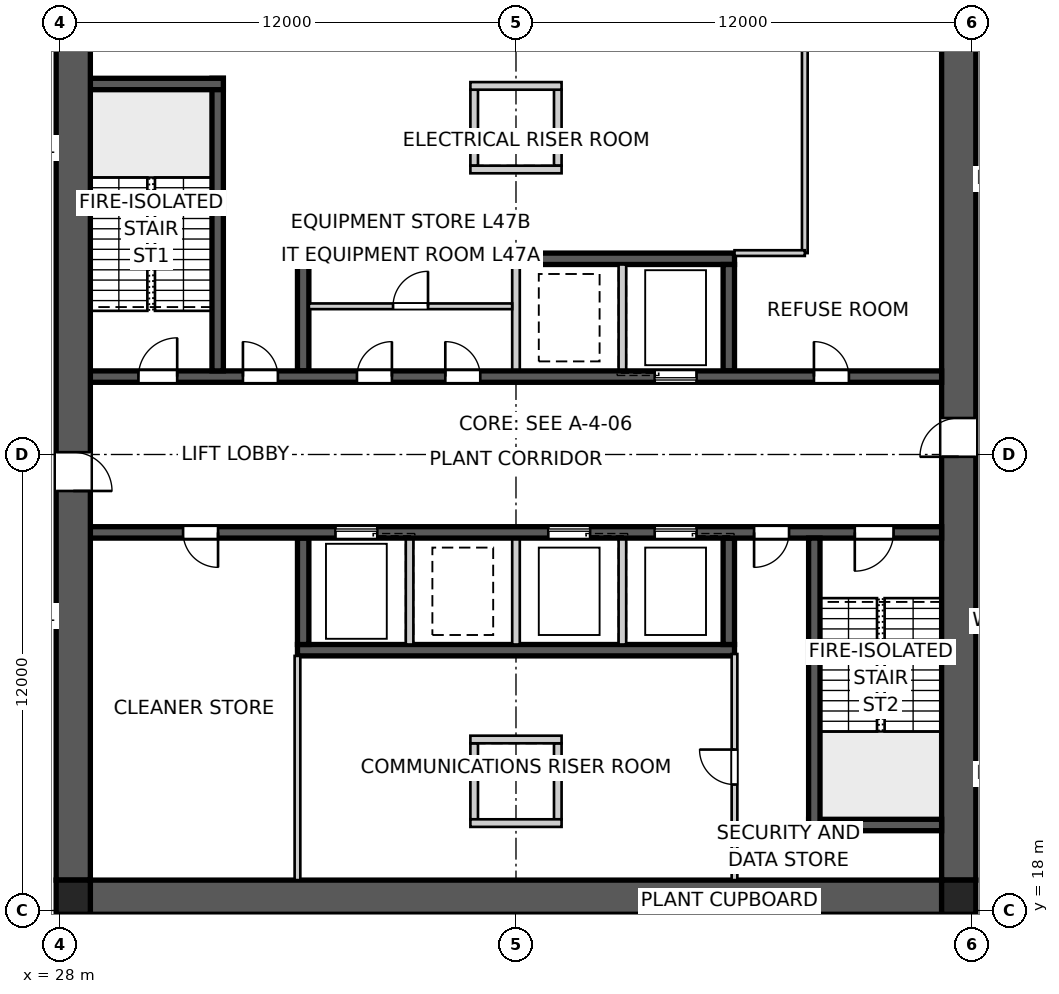
"""IFC4 building model, lengths in metres.
Left out: names, types, materials, properties, quantities, classifications, styles, units other than length and angle.
Written with IfcOpenShell. Run it as: python <this file> out.ifc"""

import sys

from ifc_helpers import new_model, si_unit, direction, frame, frame_2d, origin, origin_2d, place, context, subcontext, project, spatial, polyline, rectangle, outline, extrude, element, fill, save


model = new_model("IFC4")
c1 = context("Model", 3, precision=1e-05, world=origin(), true_north=direction((0.0, 1.0)))
c2 = subcontext(c1, "Body", "Model", "MODEL_VIEW")
j1 = project(units=[si_unit("LENGTHUNIT", "METRE"), si_unit("PLANEANGLEUNIT", "RADIAN")], contexts=[c1])
p1 = place(None, origin())
s1 = spatial("IfcSite", under=j1, at=p1, CompositionType="ELEMENT")
p2 = place(p1, origin())
s2 = spatial("IfcBuilding", under=s1, at=p2, CompositionType="ELEMENT")
p3 = place(p2, frame((0.0, 0.0, 171.0)))
s3 = spatial("IfcBuildingStorey", under=s2, at=p3, CompositionType="ELEMENT", Elevation=171.0)
p4 = place(p3, frame((51.2, 18.35, 0.0), z_axis=(0.0, 0.0, 1.0), x_axis=(-1.0, 0.0, 0.0)))
e1 = element("IfcWall", 1, at=p4, inside=s3, PredefinedType="SHEAR", context=c2, shape_type="SweptSolid", body=[
    extrude(outline(polyline([(0.0, -0.45), (22.4, -0.45), (22.4, -0.025), (22.85, -0.025), (22.85, 0.025), (22.4, 0.025), (22.4, 0.45), (0.0, 0.45), (0.0, 0.025), (-0.45, 0.025), (-0.45, -0.025), (0.0, -0.025), (0.0, -0.45)])), origin(), (0.0, 0.0, 1.0), 5.0),
])
p5 = place(p3, frame((51.65, 18.8, 0.0), z_axis=(0.0, 0.0, 1.0), x_axis=(0.0, 1.0, 0.0)))
e2 = element("IfcWall", 2, at=p5, inside=s3, PredefinedType="SHEAR", context=c2, shape_type="SweptSolid", body=[
    extrude(outline(polyline([(0.0, -0.45), (22.4, -0.45), (22.4, -0.025), (22.85, -0.025), (22.85, 0.025), (22.4, 0.025), (22.4, 0.45), (0.0, 0.45), (0.0, 0.025), (-0.45, 0.025), (-0.45, -0.025), (0.0, -0.025), (0.0, -0.45)])), origin(), (0.0, 0.0, 1.0), 5.0),
])
p6 = place(p5, frame((11.14, 0.0, 0.0)))
e3 = element("IfcOpeningElement", 3, at=p6, cuts=e2, PredefinedType="OPENING", context=c2, shape_type="SweptSolid", body=[
    extrude(rectangle(XDim=1.02, YDim=2.4, at=frame_2d((0.51, 1.2))), frame((0.0, 0.46, 0.0), z_axis=(0.0, -1.0, 0.0), x_axis=(1.0, 0.0, 0.0)), (0.0, 0.0, 1.0), 0.92),
])
p7 = place(p3, frame((28.35, 41.2, 0.0), z_axis=(0.0, 0.0, 1.0), x_axis=(0.0, -1.0, 0.0)))
e4 = element("IfcWall", 4, at=p7, inside=s3, PredefinedType="SHEAR", context=c2, shape_type="SweptSolid", body=[
    extrude(outline(polyline([(0.0, -0.45), (22.4, -0.45), (22.4, -0.025), (22.85, -0.025), (22.85, 0.025), (22.4, 0.025), (22.4, 0.45), (0.0, 0.45), (0.0, 0.025), (-0.45, 0.025), (-0.45, -0.025), (0.0, -0.025), (0.0, -0.45)])), origin(), (0.0, 0.0, 1.0), 5.0),
])
p8 = place(p7, frame((11.14, 0.0, 0.0)))
e5 = element("IfcOpeningElement", 5, at=p8, cuts=e4, PredefinedType="OPENING", context=c2, shape_type="SweptSolid", body=[
    extrude(rectangle(XDim=1.02, YDim=2.4, at=frame_2d((0.51, 1.2))), frame((0.0, 0.46, 0.0), z_axis=(0.0, -1.0, 0.0), x_axis=(1.0, 0.0, 0.0)), (0.0, 0.0, 1.0), 0.92),
])
p9 = place(p3, frame((28.8, 32.05, 0.0), z_axis=(0.0, 0.0, 1.0), x_axis=(1.0, 0.0, 0.0)))
e6 = element("IfcWall", 6, at=p9, inside=s3, PredefinedType="SHEAR", context=c2, shape_type="SweptSolid", body=[
    extrude(rectangle(XDim=22.4, YDim=0.3, at=frame_2d((11.2, 0.0))), origin(), (0.0, 0.0, 1.0), 5.0),
])
p10 = place(p9, frame((19.04, 0.0, 0.0)))
e7 = element("IfcOpeningElement", 7, at=p10, cuts=e6, PredefinedType="OPENING", context=c2, shape_type="SweptSolid", body=[
    extrude(rectangle(XDim=0.92, YDim=2.1, at=frame_2d((0.46, 1.05))), frame((0.0, 0.16, 0.0), z_axis=(0.0, -1.0, 0.0), x_axis=(1.0, 0.0, 0.0)), (0.0, 0.0, 1.0), 0.32),
])
p11 = place(p9, frame((1.265, 0.0, 0.0)))
e8 = element("IfcOpeningElement", 8, at=p11, cuts=e6, PredefinedType="OPENING", context=c2, shape_type="SweptSolid", body=[
    extrude(rectangle(XDim=1.02, YDim=2.1, at=frame_2d((0.51, 1.05))), frame((0.0, 0.16, 0.0), z_axis=(0.0, -1.0, 0.0), x_axis=(1.0, 0.0, 0.0)), (0.0, 0.0, 1.0), 0.32),
])
p12 = place(p9, frame((4.015, 0.0, 0.0)))
e9 = element("IfcOpeningElement", 9, at=p12, cuts=e6, PredefinedType="OPENING", context=c2, shape_type="SweptSolid", body=[
    extrude(rectangle(XDim=0.92, YDim=2.1, at=frame_2d((0.46, 1.05))), frame((0.0, 0.16, 0.0), z_axis=(0.0, -1.0, 0.0), x_axis=(1.0, 0.0, 0.0)), (0.0, 0.0, 1.0), 0.32),
])
p13 = place(p9, frame((7.015, 0.0, 0.0)))
e10 = element("IfcOpeningElement", 10, at=p13, cuts=e6, PredefinedType="OPENING", context=c2, shape_type="SweptSolid", body=[
    extrude(rectangle(XDim=0.92, YDim=2.1, at=frame_2d((0.46, 1.05))), frame((0.0, 0.16, 0.0), z_axis=(0.0, -1.0, 0.0), x_axis=(1.0, 0.0, 0.0)), (0.0, 0.0, 1.0), 0.32),
])
p14 = place(p9, frame((9.34, 0.0, 0.0)))
e11 = element("IfcOpeningElement", 11, at=p14, cuts=e6, PredefinedType="OPENING", context=c2, shape_type="SweptSolid", body=[
    extrude(rectangle(XDim=0.92, YDim=2.1, at=frame_2d((0.46, 1.05))), frame((0.0, 0.16, 0.0), z_axis=(0.0, -1.0, 0.0), x_axis=(1.0, 0.0, 0.0)), (0.0, 0.0, 1.0), 0.32),
])
p15 = place(p9, frame((14.85, 0.0, 0.0)))
e12 = element("IfcOpeningElement", 12, at=p15, cuts=e6, PredefinedType="OPENING", context=c2, shape_type="SweptSolid", body=[
    extrude(rectangle(XDim=1.1, YDim=2.1, at=frame_2d((0.55, 1.05))), frame((0.0, 0.16, 0.0), z_axis=(0.0, -1.0, 0.0), x_axis=(1.0, 0.0, 0.0)), (0.0, 0.0, 1.0), 0.32),
])
p16 = place(p3, frame((51.2, 27.95, 0.0), z_axis=(0.0, 0.0, 1.0), x_axis=(-1.0, 0.0, 0.0)))
e13 = element("IfcWall", 13, at=p16, inside=s3, PredefinedType="SHEAR", context=c2, shape_type="SweptSolid", body=[
    extrude(rectangle(XDim=22.4, YDim=0.3, at=frame_2d((11.2, 0.0))), origin(), (0.0, 0.0, 1.0), 5.0),
])
p17 = place(p16, frame((19.04, 0.0, 0.0)))
e14 = element("IfcOpeningElement", 14, at=p17, cuts=e13, PredefinedType="OPENING", context=c2, shape_type="SweptSolid", body=[
    extrude(rectangle(XDim=0.92, YDim=2.1, at=frame_2d((0.46, 1.05))), frame((0.0, 0.16, 0.0), z_axis=(0.0, -1.0, 0.0), x_axis=(1.0, 0.0, 0.0)), (0.0, 0.0, 1.0), 0.32),
])
p18 = place(p16, frame((1.265, 0.0, 0.0)))
e15 = element("IfcOpeningElement", 15, at=p18, cuts=e13, PredefinedType="OPENING", context=c2, shape_type="SweptSolid", body=[
    extrude(rectangle(XDim=1.02, YDim=2.1, at=frame_2d((0.51, 1.05))), frame((0.0, 0.16, 0.0), z_axis=(0.0, -1.0, 0.0), x_axis=(1.0, 0.0, 0.0)), (0.0, 0.0, 1.0), 0.32),
])
p19 = place(p16, frame((4.015, 0.0, 0.0)))
e16 = element("IfcOpeningElement", 16, at=p19, cuts=e13, PredefinedType="OPENING", context=c2, shape_type="SweptSolid", body=[
    extrude(rectangle(XDim=0.92, YDim=2.1, at=frame_2d((0.46, 1.05))), frame((0.0, 0.16, 0.0), z_axis=(0.0, -1.0, 0.0), x_axis=(1.0, 0.0, 0.0)), (0.0, 0.0, 1.0), 0.32),
])
p20 = place(p16, frame((6.45, 0.0, 0.0)))
e17 = element("IfcOpeningElement", 17, at=p20, cuts=e13, PredefinedType="OPENING", context=c2, shape_type="SweptSolid", body=[
    extrude(rectangle(XDim=1.1, YDim=2.1, at=frame_2d((0.55, 1.05))), frame((0.0, 0.16, 0.0), z_axis=(0.0, -1.0, 0.0), x_axis=(1.0, 0.0, 0.0)), (0.0, 0.0, 1.0), 0.32),
])
p21 = place(p16, frame((9.25, 0.0, 0.0)))
e18 = element("IfcOpeningElement", 18, at=p21, cuts=e13, PredefinedType="OPENING", context=c2, shape_type="SweptSolid", body=[
    extrude(rectangle(XDim=1.1, YDim=2.1, at=frame_2d((0.55, 1.05))), frame((0.0, 0.16, 0.0), z_axis=(0.0, -1.0, 0.0), x_axis=(1.0, 0.0, 0.0)), (0.0, 0.0, 1.0), 0.32),
])
p22 = place(p16, frame((14.85, 0.0, 0.0)))
e19 = element("IfcOpeningElement", 19, at=p22, cuts=e13, PredefinedType="OPENING", context=c2, shape_type="SweptSolid", body=[
    extrude(rectangle(XDim=1.1, YDim=2.1, at=frame_2d((0.55, 1.05))), frame((0.0, 0.16, 0.0), z_axis=(0.0, -1.0, 0.0), x_axis=(1.0, 0.0, 0.0)), (0.0, 0.0, 1.0), 0.32),
])
for number, where, z_axis, x_axis in (
    (20, (34.25, 35.15, 0.0), (0.0, 0.0, 1.0), (1.0, 0.0, 0.0)),
    (21, (45.75, 24.85, 0.0), (0.0, 0.0, 1.0), (-1.0, 0.0, 0.0)),
):
    element("IfcWall", number, at=place(p3, frame(where, z_axis=z_axis, x_axis=x_axis)), inside=s3, PredefinedType="SHEAR", context=c2, shape_type="SweptSolid", body=[
        extrude(rectangle(XDim=11.5, YDim=0.3, at=frame_2d((5.75, 0.0))), origin(), (0.0, 0.0, 1.0), 5.0),
    ])
for number, where, z_axis, x_axis in (
    (22, (34.4, 32.2, 0.0), (0.0, 0.0, 1.0), (0.0, 1.0, 0.0)),
    (23, (45.6, 27.8, 0.0), (0.0, 0.0, 1.0), (0.0, -1.0, 0.0)),
):
    element("IfcWall", number, at=place(p3, frame(where, z_axis=z_axis, x_axis=x_axis)), inside=s3, PredefinedType="SHEAR", context=c2, shape_type="SweptSolid", body=[
        extrude(rectangle(XDim=2.8, YDim=0.3, at=frame_2d((1.4, 0.0))), origin(), (0.0, 0.0, 1.0), 5.0),
    ])
for number, where, z_axis, x_axis in (
    (24, (42.8, 27.8, 0.0), (0.0, 0.0, 1.0), (0.0, -1.0, 0.0)),
    (25, (40.0, 32.2, 0.0), (0.0, 0.0, 1.0), (0.0, 1.0, 0.0)),
    (26, (40.0, 27.8, 0.0), (0.0, 0.0, 1.0), (0.0, -1.0, 0.0)),
    (27, (42.8, 32.2, 0.0), (0.0, 0.0, 1.0), (0.0, 1.0, 0.0)),
    (28, (37.2, 27.8, 0.0), (0.0, 0.0, 1.0), (0.0, -1.0, 0.0)),
):
    element("IfcWall", number, at=place(p3, frame(where, z_axis=z_axis, x_axis=x_axis)), inside=s3, PredefinedType="SOLIDWALL", context=c2, shape_type="SweptSolid", body=[
        extrude(rectangle(XDim=2.8, YDim=0.2, at=frame_2d((1.4, 0.0))), origin(), (0.0, 0.0, 1.0), 5.0),
    ])
for number, where, z_axis, x_axis in (
    (29, (45.6, 32.2, 0.0), (0.0, 0.0, 1.0), (0.0, 1.0, 0.0)),
    (30, (34.4, 27.8, 0.0), (0.0, 0.0, 1.0), (0.0, -1.0, 0.0)),
):
    element("IfcWall", number, at=place(p3, frame(where, z_axis=z_axis, x_axis=x_axis)), inside=s3, PredefinedType="SHEAR", context=c2, shape_type="SweptSolid", body=[
        extrude(rectangle(XDim=2.8, YDim=0.3, at=frame_2d((1.4, 0.0))), origin(), (0.0, 0.0, 1.0), 5.0),
    ])
p23 = place(p3, frame((32.15, 32.2, 0.0), z_axis=(0.0, 0.0, 1.0), x_axis=(0.0, 1.0, 0.0)))
e31 = element("IfcWall", 31, at=p23, inside=s3, PredefinedType="SHEAR", context=c2, shape_type="SweptSolid", body=[
    extrude(rectangle(XDim=7.7, YDim=0.3, at=frame_2d((3.85, 0.0))), origin(), (0.0, 0.0, 1.0), 5.0),
])
p24 = place(p3, frame((28.8, 39.75, 0.0), z_axis=(0.0, 0.0, 1.0), x_axis=(1.0, 0.0, 0.0)))
e32 = element("IfcWall", 32, at=p24, inside=s3, PredefinedType="SHEAR", context=c2, shape_type="SweptSolid", body=[
    extrude(rectangle(XDim=3.5, YDim=0.3, at=frame_2d((1.75, 0.0))), origin(), (0.0, 0.0, 1.0), 5.0),
])
p25 = place(p3, frame((47.85, 27.8, 0.0), z_axis=(0.0, 0.0, 1.0), x_axis=(0.0, -1.0, 0.0)))
e33 = element("IfcWall", 33, at=p25, inside=s3, PredefinedType="SHEAR", context=c2, shape_type="SweptSolid", body=[
    extrude(rectangle(XDim=7.7, YDim=0.3, at=frame_2d((3.85, 0.0))), origin(), (0.0, 0.0, 1.0), 5.0),
])
p26 = place(p3, frame((51.2, 20.25, 0.0), z_axis=(0.0, 0.0, 1.0), x_axis=(-1.0, 0.0, 0.0)))
e34 = element("IfcWall", 34, at=p26, inside=s3, PredefinedType="SHEAR", context=c2, shape_type="SweptSolid", body=[
    extrude(rectangle(XDim=3.5, YDim=0.3, at=frame_2d((1.75, 0.0))), origin(), (0.0, 0.0, 1.0), 5.0),
])
for number, where, z_axis, x_axis in (
    (35, (38.9, 37.6, 0.0), (0.0, 0.0, 1.0), (0.0, 1.0, 0.0)),
    (36, (41.1, 37.6, 0.0), (0.0, 0.0, 1.0), (0.0, 1.0, 0.0)),
):
    element("IfcWall", number, at=place(p3, frame(where, z_axis=z_axis, x_axis=x_axis)), inside=s3, PredefinedType="SOLIDWALL", context=c2, shape_type="SweptSolid", body=[
        extrude(rectangle(XDim=2.0, YDim=0.2, at=frame_2d((1.0, 0.0))), origin(), (0.0, 0.0, 1.0), 5.0),
    ])
for number, where, z_axis, x_axis in (
    (37, (38.8, 37.5, 0.0), (0.0, 0.0, 1.0), (1.0, 0.0, 0.0)),
    (38, (38.8, 39.7, 0.0), (0.0, 0.0, 1.0), (1.0, 0.0, 0.0)),
):
    element("IfcWall", number, at=place(p3, frame(where, z_axis=z_axis, x_axis=x_axis)), inside=s3, PredefinedType="SOLIDWALL", context=c2, shape_type="SweptSolid", body=[
        extrude(rectangle(XDim=2.4, YDim=0.2, at=frame_2d((1.2, 0.0))), origin(), (0.0, 0.0, 1.0), 5.0),
    ])
for number, where, z_axis, x_axis in (
    (39, (38.9, 22.4, 0.0), (0.0, 0.0, 1.0), (0.0, -1.0, 0.0)),
    (40, (41.1, 22.4, 0.0), (0.0, 0.0, 1.0), (0.0, -1.0, 0.0)),
):
    element("IfcWall", number, at=place(p3, frame(where, z_axis=z_axis, x_axis=x_axis)), inside=s3, PredefinedType="SOLIDWALL", context=c2, shape_type="SweptSolid", body=[
        extrude(rectangle(XDim=2.0, YDim=0.2, at=frame_2d((1.0, 0.0))), origin(), (0.0, 0.0, 1.0), 5.0),
    ])
for number, where, z_axis, x_axis in (
    (41, (38.8, 22.5, 0.0), (0.0, 0.0, 1.0), (1.0, 0.0, 0.0)),
    (42, (38.8, 20.3, 0.0), (0.0, 0.0, 1.0), (1.0, 0.0, 0.0)),
):
    element("IfcWall", number, at=place(p3, frame(where, z_axis=z_axis, x_axis=x_axis)), inside=s3, PredefinedType="SOLIDWALL", context=c2, shape_type="SweptSolid", body=[
        extrude(rectangle(XDim=2.4, YDim=0.2, at=frame_2d((1.2, 0.0))), origin(), (0.0, 0.0, 1.0), 5.0),
    ])
for number, where, z_axis, x_axis in (
    (43, (28.35, 18.35, 0.0), (0.0, 0.0, 1.0), (1.0, 0.0, 0.0)),
    (44, (51.65, 18.35, 0.0), (0.0, 0.0, 1.0), (1.0, 0.0, 0.0)),
):
    element("IfcColumn", number, at=place(p3, frame(where, z_axis=z_axis, x_axis=x_axis)), inside=s3, PredefinedType="COLUMN", context=c2, shape_type="SweptSolid", body=[
        extrude(rectangle(XDim=0.9, YDim=0.9, at=origin_2d()), origin(), (0.0, 0.0, 1.0), 5.0),
    ])
p27 = place(p3, frame((47.6, 41.2, 0.0), z_axis=(0.0, 0.0, 1.0), x_axis=(0.0, -1.0, 0.0)))
e45 = element("IfcWall", 45, at=p27, inside=s3, PredefinedType="SOLIDWALL", context=c2, shape_type="SweptSolid", body=[
    extrude(rectangle(XDim=5.9, YDim=0.15, at=frame_2d((2.95, 0.0))), origin(), (0.0, 0.0, 1.0), 4.85),
])
p28 = place(p3, frame((47.6, 35.3, 0.0), z_axis=(0.0, 0.0, 1.0), x_axis=(-1.0, 0.0, 0.0)))
e46 = element("IfcWall", 46, at=p28, inside=s3, PredefinedType="SOLIDWALL", context=c2, shape_type="SweptSolid", body=[
    extrude(rectangle(XDim=1.85, YDim=0.15, at=frame_2d((0.925, 0.0))), origin(), (0.0, 0.0, 1.0), 4.85),
])
p29 = place(p3, frame((45.75, 18.8, 0.0), z_axis=(0.0, 0.0, 1.0), x_axis=(0.0, 1.0, 0.0)))
e47 = element("IfcWall", 47, at=p29, inside=s3, PredefinedType="SOLIDWALL", context=c2, shape_type="SweptSolid", body=[
    extrude(rectangle(XDim=5.95, YDim=0.15, at=frame_2d((2.975, 0.0))), origin(), (0.0, 0.0, 1.0), 4.85),
])
p30 = place(p29, frame((2.515, 0.0, 0.0)))
e48 = element("IfcOpeningElement", 48, at=p30, cuts=e47, PredefinedType="OPENING", context=c2, shape_type="SweptSolid", body=[
    extrude(rectangle(XDim=0.92, YDim=2.1, at=frame_2d((0.46, 1.05))), frame((0.0, 0.085, 0.0), z_axis=(0.0, -1.0, 0.0), x_axis=(1.0, 0.0, 0.0)), (0.0, 0.0, 1.0), 0.17),
])
p31 = place(p3, frame((34.25, 18.8, 0.0), z_axis=(0.0, 0.0, 1.0), x_axis=(0.0, 1.0, 0.0)))
e49 = element("IfcWall", 49, at=p31, inside=s3, PredefinedType="SOLIDWALL", context=c2, shape_type="SweptSolid", body=[
    extrude(rectangle(XDim=5.9, YDim=0.15, at=frame_2d((2.95, 0.0))), origin(), (0.0, 0.0, 1.0), 4.85),
])
p32 = place(p3, frame((34.55, 33.9, 0.0), z_axis=(0.0, 0.0, 1.0), x_axis=(1.0, 0.0, 0.0)))
e50 = element("IfcWall", 50, at=p32, inside=s3, PredefinedType="SOLIDWALL", context=c2, shape_type="SweptSolid", body=[
    extrude(rectangle(XDim=5.35, YDim=0.15, at=frame_2d((2.675, 0.0))), origin(), (0.0, 0.0, 1.0), 4.85),
])
p33 = place(p32, frame((2.215, 0.0, 0.0)))
e51 = element("IfcOpeningElement", 51, at=p33, cuts=e50, PredefinedType="OPENING", context=c2, shape_type="SweptSolid", body=[
    extrude(rectangle(XDim=0.92, YDim=2.1, at=frame_2d((0.46, 1.05))), frame((0.0, 0.085, 0.0), z_axis=(0.0, -1.0, 0.0), x_axis=(1.0, 0.0, 0.0)), (0.0, 0.0, 1.0), 0.17),
])
p34 = place(p10, origin())
e52 = element("IfcDoor", 52, at=p34, inside=s3, OperationType="SINGLE_SWING_LEFT", PredefinedType="DOOR", context=c2, shape_type="SweptSolid", body=[
    extrude(rectangle(XDim=0.92, YDim=2.1, at=frame_2d((0.46, 1.05))), frame((0.0, 0.025, 0.0), z_axis=(0.0, -1.0, 0.0), x_axis=(1.0, 0.0, 0.0)), (0.0, 0.0, 1.0), 0.05),
])
fill(e7, e52)
p35 = place(p17, origin())
e53 = element("IfcDoor", 53, at=p35, inside=s3, OperationType="SINGLE_SWING_LEFT", PredefinedType="DOOR", context=c2, shape_type="SweptSolid", body=[
    extrude(rectangle(XDim=0.92, YDim=2.1, at=frame_2d((0.46, 1.05))), frame((0.0, 0.025, 0.0), z_axis=(0.0, -1.0, 0.0), x_axis=(1.0, 0.0, 0.0)), (0.0, 0.0, 1.0), 0.05),
])
fill(e14, e53)
p36 = place(p18, origin())
e54 = element("IfcDoor", 54, at=p36, inside=s3, OperationType="SINGLE_SWING_RIGHT", PredefinedType="DOOR", context=c2, shape_type="SweptSolid", body=[
    extrude(rectangle(XDim=1.02, YDim=2.1, at=frame_2d((0.51, 1.05))), frame((0.0, 0.025, 0.0), z_axis=(0.0, -1.0, 0.0), x_axis=(1.0, 0.0, 0.0)), (0.0, 0.0, 1.0), 0.05),
])
fill(e15, e54)
p37 = place(p11, origin())
e55 = element("IfcDoor", 55, at=p37, inside=s3, OperationType="SINGLE_SWING_RIGHT", PredefinedType="DOOR", context=c2, shape_type="SweptSolid", body=[
    extrude(rectangle(XDim=1.02, YDim=2.1, at=frame_2d((0.51, 1.05))), frame((0.0, 0.025, 0.0), z_axis=(0.0, -1.0, 0.0), x_axis=(1.0, 0.0, 0.0)), (0.0, 0.0, 1.0), 0.05),
])
fill(e8, e55)
p38 = place(p12, origin())
e56 = element("IfcDoor", 56, at=p38, inside=s3, OperationType="SINGLE_SWING_LEFT", PredefinedType="DOOR", context=c2, shape_type="SweptSolid", body=[
    extrude(rectangle(XDim=0.92, YDim=2.1, at=frame_2d((0.46, 1.05))), frame((0.0, 0.025, 0.0), z_axis=(0.0, -1.0, 0.0), x_axis=(1.0, 0.0, 0.0)), (0.0, 0.0, 1.0), 0.05),
])
fill(e9, e56)
p39 = place(p19, origin())
e57 = element("IfcDoor", 57, at=p39, inside=s3, OperationType="SINGLE_SWING_RIGHT", PredefinedType="DOOR", context=c2, shape_type="SweptSolid", body=[
    extrude(rectangle(XDim=0.92, YDim=2.1, at=frame_2d((0.46, 1.05))), frame((0.0, 0.025, 0.0), z_axis=(0.0, -1.0, 0.0), x_axis=(1.0, 0.0, 0.0)), (0.0, 0.0, 1.0), 0.05),
])
fill(e16, e57)
p40 = place(p30, origin())
e58 = element("IfcDoor", 58, at=p40, inside=s3, OperationType="SINGLE_SWING_RIGHT", PredefinedType="DOOR", context=c2, shape_type="SweptSolid", body=[
    extrude(rectangle(XDim=0.92, YDim=2.1, at=frame_2d((0.46, 1.05))), frame((0.0, 0.025, 0.0), z_axis=(0.0, -1.0, 0.0), x_axis=(1.0, 0.0, 0.0)), (0.0, 0.0, 1.0), 0.05),
])
fill(e48, e58)
p41 = place(p13, origin())
e59 = element("IfcDoor", 59, at=p41, inside=s3, OperationType="SINGLE_SWING_RIGHT", PredefinedType="DOOR", context=c2, shape_type="SweptSolid", body=[
    extrude(rectangle(XDim=0.92, YDim=2.1, at=frame_2d((0.46, 1.05))), frame((0.0, 0.025, 0.0), z_axis=(0.0, -1.0, 0.0), x_axis=(1.0, 0.0, 0.0)), (0.0, 0.0, 1.0), 0.05),
])
fill(e10, e59)
p42 = place(p14, origin())
e60 = element("IfcDoor", 60, at=p42, inside=s3, OperationType="SINGLE_SWING_LEFT", PredefinedType="DOOR", context=c2, shape_type="SweptSolid", body=[
    extrude(rectangle(XDim=0.92, YDim=2.1, at=frame_2d((0.46, 1.05))), frame((0.0, 0.025, 0.0), z_axis=(0.0, -1.0, 0.0), x_axis=(1.0, 0.0, 0.0)), (0.0, 0.0, 1.0), 0.05),
])
fill(e11, e60)
p43 = place(p33, origin())
e61 = element("IfcDoor", 61, at=p43, inside=s3, OperationType="SINGLE_SWING_RIGHT", PredefinedType="DOOR", context=c2, shape_type="SweptSolid", body=[
    extrude(rectangle(XDim=0.92, YDim=2.1, at=frame_2d((0.46, 1.05))), frame((0.0, 0.025, 0.0), z_axis=(0.0, -1.0, 0.0), x_axis=(1.0, 0.0, 0.0)), (0.0, 0.0, 1.0), 0.05),
])
fill(e51, e61)
p44 = place(p6, origin())
e62 = element("IfcDoor", 62, at=p44, inside=s3, OperationType="SINGLE_SWING_LEFT", PredefinedType="DOOR", context=c2, shape_type="SweptSolid", body=[
    extrude(rectangle(XDim=1.02, YDim=2.4, at=frame_2d((0.51, 1.2))), frame((0.0, 0.025, 0.0), z_axis=(0.0, -1.0, 0.0), x_axis=(1.0, 0.0, 0.0)), (0.0, 0.0, 1.0), 0.05),
])
fill(e3, e62)
p45 = place(p8, origin())
e63 = element("IfcDoor", 63, at=p45, inside=s3, OperationType="SINGLE_SWING_RIGHT", PredefinedType="DOOR", context=c2, shape_type="SweptSolid", body=[
    extrude(rectangle(XDim=1.02, YDim=2.4, at=frame_2d((0.51, 1.2))), frame((0.0, 0.025, 0.0), z_axis=(0.0, -1.0, 0.0), x_axis=(1.0, 0.0, 0.0)), (0.0, 0.0, 1.0), 0.05),
])
fill(e5, e63)
p46 = place(p20, origin())
e64 = element("IfcDoor", 64, at=p46, inside=s3, OperationType="SLIDING_TO_LEFT", PredefinedType="DOOR", context=c2, shape_type="SweptSolid", body=[
    extrude(rectangle(XDim=1.1, YDim=2.1, at=frame_2d((0.55, 1.05))), frame((0.0, 0.025, 0.0), z_axis=(0.0, -1.0, 0.0), x_axis=(1.0, 0.0, 0.0)), (0.0, 0.0, 1.0), 0.05),
])
fill(e17, e64)
p47 = place(p21, origin())
e65 = element("IfcDoor", 65, at=p47, inside=s3, OperationType="SLIDING_TO_LEFT", PredefinedType="DOOR", context=c2, shape_type="SweptSolid", body=[
    extrude(rectangle(XDim=1.1, YDim=2.1, at=frame_2d((0.55, 1.05))), frame((0.0, 0.025, 0.0), z_axis=(0.0, -1.0, 0.0), x_axis=(1.0, 0.0, 0.0)), (0.0, 0.0, 1.0), 0.05),
])
fill(e18, e65)
p48 = place(p15, origin())
e66 = element("IfcDoor", 66, at=p48, inside=s3, OperationType="SLIDING_TO_LEFT", PredefinedType="DOOR", context=c2, shape_type="SweptSolid", body=[
    extrude(rectangle(XDim=1.1, YDim=2.1, at=frame_2d((0.55, 1.05))), frame((0.0, 0.025, 0.0), z_axis=(0.0, -1.0, 0.0), x_axis=(1.0, 0.0, 0.0)), (0.0, 0.0, 1.0), 0.05),
])
fill(e12, e66)
p49 = place(p22, origin())
e67 = element("IfcDoor", 67, at=p49, inside=s3, OperationType="SLIDING_TO_LEFT", PredefinedType="DOOR", context=c2, shape_type="SweptSolid", body=[
    extrude(rectangle(XDim=1.1, YDim=2.1, at=frame_2d((0.55, 1.05))), frame((0.0, 0.025, 0.0), z_axis=(0.0, -1.0, 0.0), x_axis=(1.0, 0.0, 0.0)), (0.0, 0.0, 1.0), 0.05),
])
fill(e19, e67)
save(model, sys.argv[1])
